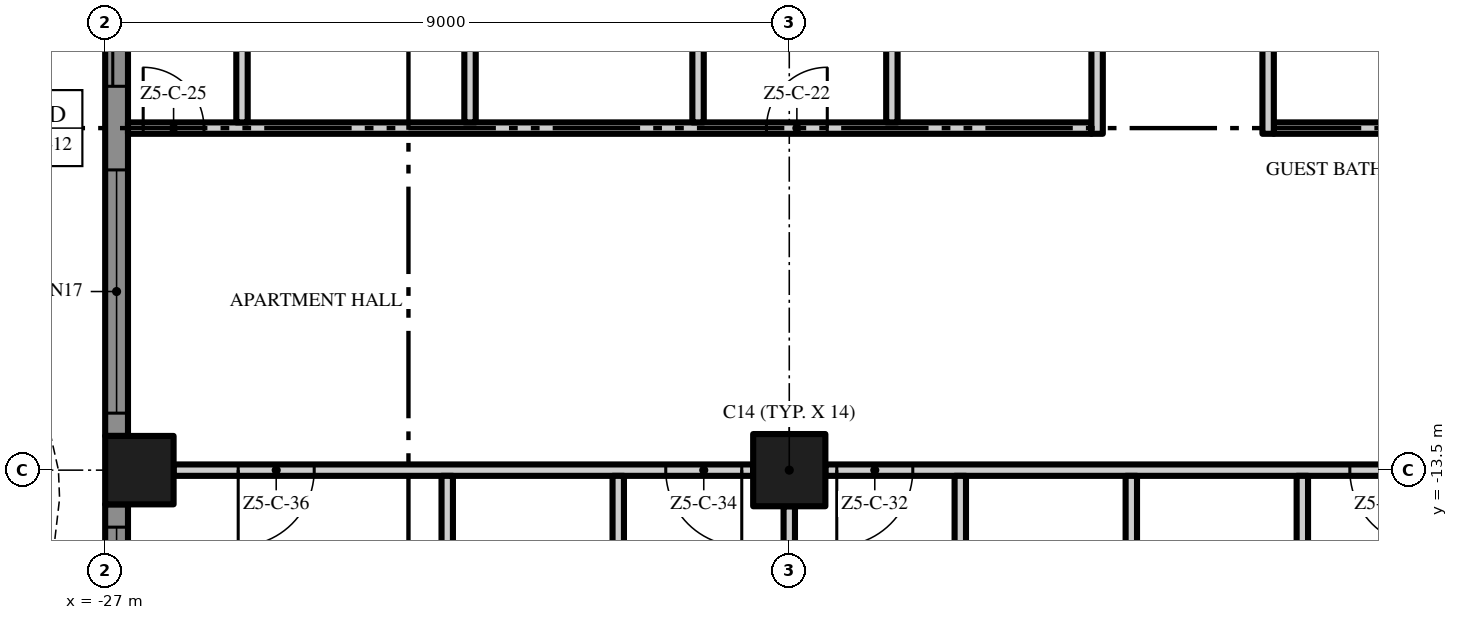
"""IFC4 building model, lengths in metres.
Left out: names, types, materials, properties, quantities, classifications, styles, units other than length and angle.
Written with IfcOpenShell. Run it as: python <this file> out.ifc"""

import sys

from ifc_helpers import new_model, si_unit, direction, frame, frame_2d, origin, origin_2d, place, context, subcontext, project, spatial, polyline, rectangle, outline, extrude, element, fill, save


model = new_model("IFC4")
c1 = context("Model", 3, precision=1e-05, world=origin(), true_north=direction((0.0, 1.0)))
c2 = subcontext(c1, "Body", "Model", "MODEL_VIEW")
j1 = project(units=[si_unit("LENGTHUNIT", "METRE"), si_unit("PLANEANGLEUNIT", "RADIAN")], contexts=[c1])
p1 = place(None, origin())
s1 = spatial("IfcSite", under=j1, at=p1, CompositionType="ELEMENT")
p2 = place(p1, origin())
s2 = spatial("IfcBuilding", under=s1, at=p2, CompositionType="ELEMENT")
p3 = place(p2, frame((0.0, 0.0, 261.6)))
s3 = spatial("IfcBuildingStorey", under=s2, at=p3, CompositionType="ELEMENT", Elevation=261.6)
p4 = place(p3, frame((-18.0, -13.5, 0.0), z_axis=(0.0, 0.0, 1.0), x_axis=(1.0, 0.0, 0.0)))
e1 = element("IfcColumn", 1, at=p4, inside=s3, PredefinedType="COLUMN", context=c2, shape_type="SweptSolid", body=[
    extrude(rectangle(XDim=0.95, YDim=0.95, at=origin_2d()), origin(), (0.0, 0.0, 1.0), 3.5),
])
p5 = place(p3, frame((-26.55, -13.5, 0.0), z_axis=(0.0, 0.0, 1.0), x_axis=(1.0, 0.0, 0.0)))
e2 = element("IfcColumn", 2, at=p5, inside=s3, PredefinedType="COLUMN", context=c2, shape_type="SweptSolid", body=[
    extrude(rectangle(XDim=0.9, YDim=0.9, at=origin_2d()), origin(), (0.0, 0.0, 1.0), 3.5),
])
p6 = place(p3, frame((-26.85, -13.05, 0.0), z_axis=(0.0, 0.0, 1.0), x_axis=(0.0, 1.0, 0.0)))
e3 = element("IfcWall", 3, at=p6, inside=s3, PredefinedType="SOLIDWALL", context=c2, shape_type="SweptSolid", body=[
    extrude(rectangle(XDim=8.1, YDim=0.3, at=frame_2d((4.05, 0.0))), origin(), (0.0, 0.0, 1.0), 3.5),
])
p7 = place(p6, frame((4.6, 0.0, 0.0)))
e4 = element("IfcOpeningElement", 4, at=p7, cuts=e3, PredefinedType="OPENING", context=c2, shape_type="SweptSolid", body=[
    extrude(rectangle(XDim=3.2, YDim=2.4, at=frame_2d((1.6, 1.2))), frame((0.0, 0.16, 0.0), z_axis=(0.0, -1.0, 0.0), x_axis=(1.0, 0.0, 0.0)), (0.0, 0.0, 1.0), 0.32),
])
p8 = place(p6, frame((0.3, 0.0, 0.45)))
e5 = element("IfcOpeningElement", 5, at=p8, cuts=e3, PredefinedType="OPENING", context=c2, shape_type="SweptSolid", body=[
    extrude(rectangle(XDim=3.2, YDim=2.65, at=frame_2d((1.6, 1.325))), frame((0.0, 0.16, 0.0), z_axis=(0.0, -1.0, 0.0), x_axis=(1.0, 0.0, 0.0)), (0.0, 0.0, 1.0), 0.32),
])
p9 = place(p3, frame((-26.85, -18.0, 0.0), z_axis=(0.0, 0.0, 1.0), x_axis=(0.0, 1.0, 0.0)))
e6 = element("IfcWall", 6, at=p9, inside=s3, PredefinedType="SOLIDWALL", context=c2, shape_type="SweptSolid", body=[
    extrude(rectangle(XDim=4.05, YDim=0.3, at=frame_2d((2.025, 0.0))), origin(), (0.0, 0.0, 1.0), 3.5),
])
p10 = place(p9, frame((0.55, 0.0, 0.45)))
e7 = element("IfcOpeningElement", 7, at=p10, cuts=e6, PredefinedType="OPENING", context=c2, shape_type="SweptSolid", body=[
    extrude(rectangle(XDim=3.2, YDim=2.65, at=frame_2d((1.6, 1.325))), frame((0.0, 0.16, 0.0), z_axis=(0.0, -1.0, 0.0), x_axis=(1.0, 0.0, 0.0)), (0.0, 0.0, 1.0), 0.32),
])
p11 = place(p3, origin())
e8 = element("IfcWall", 8, at=p11, inside=s3, PredefinedType="USERDEFINED", context=c2, shape_type="SweptSolid", body=[
    extrude(outline(polyline([(-27.951, 18.0), (-27.615, 16.5), (-27.6, 16.125), (-27.731, 15.0), (-28.255, 13.5), (-28.988, 12.0), (-29.649, 10.5), (-29.985, 9.0), (-30.0, 8.625), (-29.869, 7.5), (-29.345, 6.0), (-28.612, 4.5), (-27.951, 3.0), (-27.615, 1.5), (-27.6, 1.125), (-27.731, 0.0), (-28.255, -1.5), (-28.988, -3.0), (-29.649, -4.5), (-29.985, -6.0), (-30.0, -6.375), (-29.869, -7.5), (-29.345, -9.0), (-28.612, -10.5), (-27.951, -12.0), (-27.615, -13.5), (-27.6, -13.875), (-27.731, -15.0), (-28.255, -16.5), (-28.988, -18.0), (-28.763, -18.11), (-28.024, -16.596), (-27.486, -15.056), (-27.349, -13.885), (-27.366, -13.467), (-27.713, -11.921), (-28.385, -10.395), (-29.114, -8.904), (-29.624, -7.444), (-29.749, -6.365), (-29.736, -6.033), (-29.41, -4.579), (-28.761, -3.105), (-28.024, -1.596), (-27.486, -0.056), (-27.349, 1.115), (-27.366, 1.533), (-27.713, 3.079), (-28.385, 4.605), (-29.114, 6.096), (-29.624, 7.556), (-29.749, 8.635), (-29.736, 8.967), (-29.41, 10.421), (-28.761, 11.895), (-28.024, 13.404), (-27.486, 14.944), (-27.349, 16.115), (-27.366, 16.533), (-27.708, 18.055), (-27.951, 18.0)])), origin(), (0.0, 0.0, 1.0), 0.9),
])
p12 = place(p3, frame((-18.475, -13.5, 0.0), z_axis=(0.0, 0.0, 1.0), x_axis=(-1.0, 0.0, 0.0)))
e9 = element("IfcWall", 9, at=p12, inside=s3, PredefinedType="PARTITIONING", context=c2, shape_type="SweptSolid", body=[
    extrude(rectangle(XDim=7.625, YDim=0.15, at=frame_2d((3.812, 0.0))), origin(), (0.0, 0.0, 1.0), 3.5),
])
p13 = place(p12, frame((0.15, 0.0, 0.0)))
e10 = element("IfcOpeningElement", 10, at=p13, cuts=e9, PredefinedType="OPENING", context=c2, shape_type="SweptSolid", body=[
    extrude(rectangle(XDim=1.0, YDim=2.4, at=frame_2d((0.5, 1.2))), frame((0.0, 0.085, 0.0), z_axis=(0.0, -1.0, 0.0), x_axis=(1.0, 0.0, 0.0)), (0.0, 0.0, 1.0), 0.17),
])
p14 = place(p12, frame((5.775, 0.0, 0.0)))
e11 = element("IfcOpeningElement", 11, at=p14, cuts=e9, PredefinedType="OPENING", context=c2, shape_type="SweptSolid", body=[
    extrude(rectangle(XDim=1.0, YDim=2.4, at=frame_2d((0.5, 1.2))), frame((0.0, 0.085, 0.0), z_axis=(0.0, -1.0, 0.0), x_axis=(1.0, 0.0, 0.0)), (0.0, 0.0, 1.0), 0.17),
])
p15 = place(p3, frame((-9.475, -13.5, 0.0), z_axis=(0.0, 0.0, 1.0), x_axis=(-1.0, 0.0, 0.0)))
e12 = element("IfcWall", 12, at=p15, inside=s3, PredefinedType="PARTITIONING", context=c2, shape_type="SweptSolid", body=[
    extrude(rectangle(XDim=8.05, YDim=0.15, at=frame_2d((4.025, 0.0))), origin(), (0.0, 0.0, 1.0), 3.5),
])
p16 = place(p15, frame((0.15, 0.0, 0.0)))
e13 = element("IfcOpeningElement", 13, at=p16, cuts=e12, PredefinedType="OPENING", context=c2, shape_type="SweptSolid", body=[
    extrude(rectangle(XDim=1.0, YDim=2.4, at=frame_2d((0.5, 1.2))), frame((0.0, 0.085, 0.0), z_axis=(0.0, -1.0, 0.0), x_axis=(1.0, 0.0, 0.0)), (0.0, 0.0, 1.0), 0.17),
])
p17 = place(p15, frame((6.9, 0.0, 0.0)))
e14 = element("IfcOpeningElement", 14, at=p17, cuts=e12, PredefinedType="OPENING", context=c2, shape_type="SweptSolid", body=[
    extrude(rectangle(XDim=1.0, YDim=2.4, at=frame_2d((0.5, 1.2))), frame((0.0, 0.085, 0.0), z_axis=(0.0, -1.0, 0.0), x_axis=(1.0, 0.0, 0.0)), (0.0, 0.0, 1.0), 0.17),
])
p18 = place(p3, frame((-26.7, -9.0, 0.0), z_axis=(0.0, 0.0, 1.0), x_axis=(1.0, 0.0, 0.0)))
e15 = element("IfcWall", 15, at=p18, inside=s3, PredefinedType="PARTITIONING", context=c2, shape_type="SweptSolid", body=[
    extrude(rectangle(XDim=12.675, YDim=0.15, at=frame_2d((6.338, 0.0))), origin(), (0.0, 0.0, 1.0), 3.5),
])
p19 = place(p18, frame((8.4, 0.0, 0.0)))
e16 = element("IfcOpeningElement", 16, at=p19, cuts=e15, PredefinedType="OPENING", context=c2, shape_type="SweptSolid", body=[
    extrude(rectangle(XDim=0.8, YDim=2.0, at=frame_2d((0.4, 1.0))), frame((0.0, 0.085, 0.0), z_axis=(0.0, -1.0, 0.0), x_axis=(1.0, 0.0, 0.0)), (0.0, 0.0, 1.0), 0.17),
])
p20 = place(p18, frame((0.2, 0.0, 0.0)))
e17 = element("IfcOpeningElement", 17, at=p20, cuts=e15, PredefinedType="OPENING", context=c2, shape_type="SweptSolid", body=[
    extrude(rectangle(XDim=0.8, YDim=2.0, at=frame_2d((0.4, 1.0))), frame((0.0, 0.085, 0.0), z_axis=(0.0, -1.0, 0.0), x_axis=(1.0, 0.0, 0.0)), (0.0, 0.0, 1.0), 0.17),
])
p21 = place(p3, frame((-11.625, -9.0, 0.0), z_axis=(0.0, 0.0, 1.0), x_axis=(1.0, 0.0, 0.0)))
e18 = element("IfcWall", 18, at=p21, inside=s3, PredefinedType="PARTITIONING", context=c2, shape_type="SweptSolid", body=[
    extrude(rectangle(XDim=16.025, YDim=0.15, at=frame_2d((8.012, 0.0))), origin(), (0.0, 0.0, 1.0), 3.5),
])
p22 = place(p21, frame((4.675, 0.0, 0.0)))
e19 = element("IfcOpeningElement", 19, at=p22, cuts=e18, PredefinedType="OPENING", context=c2, shape_type="SweptSolid", body=[
    extrude(rectangle(XDim=1.0, YDim=2.4, at=frame_2d((0.5, 1.2))), frame((0.0, 0.085, 0.0), z_axis=(0.0, -1.0, 0.0), x_axis=(1.0, 0.0, 0.0)), (0.0, 0.0, 1.0), 0.17),
])
p23 = place(p3, frame((-25.2, -8.925, 0.0), z_axis=(0.0, 0.0, 1.0), x_axis=(0.0, 1.0, 0.0)))
e20 = element("IfcWall", 20, at=p23, inside=s3, PredefinedType="PARTITIONING", context=c2, shape_type="SweptSolid", body=[
    extrude(rectangle(XDim=4.35, YDim=0.15, at=frame_2d((2.175, 0.0))), origin(), (0.0, 0.0, 1.0), 3.5),
])
p24 = place(p3, frame((-22.5, -17.55, 0.0), z_axis=(0.0, 0.0, 1.0), x_axis=(0.0, 1.0, 0.0)))
e21 = element("IfcWall", 21, at=p24, inside=s3, PredefinedType="PARTITIONING", context=c2, shape_type="SweptSolid", body=[
    extrude(rectangle(XDim=3.975, YDim=0.15, at=frame_2d((1.988, 0.0))), origin(), (0.0, 0.0, 1.0), 3.5),
])
p25 = place(p3, frame((-22.2, -8.925, 0.0), z_axis=(0.0, 0.0, 1.0), x_axis=(0.0, 1.0, 0.0)))
e22 = element("IfcWall", 22, at=p25, inside=s3, PredefinedType="PARTITIONING", context=c2, shape_type="SweptSolid", body=[
    extrude(rectangle(XDim=4.35, YDim=0.15, at=frame_2d((2.175, 0.0))), origin(), (0.0, 0.0, 1.0), 3.5),
])
p26 = place(p3, frame((-20.25, -16.575, 0.0), z_axis=(0.0, 0.0, 1.0), x_axis=(0.0, 1.0, 0.0)))
e23 = element("IfcWall", 23, at=p26, inside=s3, PredefinedType="PARTITIONING", context=c2, shape_type="SweptSolid", body=[
    extrude(rectangle(XDim=3.0, YDim=0.15, at=frame_2d((1.5, 0.0))), origin(), (0.0, 0.0, 1.0), 3.5),
])
p27 = place(p3, frame((-19.2, -8.925, 0.0), z_axis=(0.0, 0.0, 1.0), x_axis=(0.0, 1.0, 0.0)))
e24 = element("IfcWall", 24, at=p27, inside=s3, PredefinedType="PARTITIONING", context=c2, shape_type="SweptSolid", body=[
    extrude(rectangle(XDim=4.35, YDim=0.15, at=frame_2d((2.175, 0.0))), origin(), (0.0, 0.0, 1.0), 3.5),
])
p28 = place(p3, frame((-18.0, -21.6, 0.0), z_axis=(0.0, 0.0, 1.0), x_axis=(0.0, 1.0, 0.0)))
e25 = element("IfcWall", 25, at=p28, inside=s3, PredefinedType="PARTITIONING", context=c2, shape_type="SweptSolid", body=[
    extrude(rectangle(XDim=7.625, YDim=0.15, at=frame_2d((3.812, 0.0))), origin(), (0.0, 0.0, 1.0), 3.5),
])
p29 = place(p3, frame((-16.65, -8.925, 0.0), z_axis=(0.0, 0.0, 1.0), x_axis=(0.0, 1.0, 0.0)))
e26 = element("IfcWall", 26, at=p29, inside=s3, PredefinedType="PARTITIONING", context=c2, shape_type="SweptSolid", body=[
    extrude(rectangle(XDim=4.35, YDim=0.15, at=frame_2d((2.175, 0.0))), origin(), (0.0, 0.0, 1.0), 3.5),
])
p30 = place(p3, frame((-15.75, -16.575, 0.0), z_axis=(0.0, 0.0, 1.0), x_axis=(0.0, 1.0, 0.0)))
e27 = element("IfcWall", 27, at=p30, inside=s3, PredefinedType="PARTITIONING", context=c2, shape_type="SweptSolid", body=[
    extrude(rectangle(XDim=3.0, YDim=0.15, at=frame_2d((1.5, 0.0))), origin(), (0.0, 0.0, 1.0), 3.5),
])
p31 = place(p3, frame((-13.95, -9.075, 0.0), z_axis=(0.0, 0.0, 1.0), x_axis=(0.0, 1.0, 0.0)))
e28 = element("IfcWall", 28, at=p31, inside=s3, PredefinedType="PARTITIONING", context=c2, shape_type="SweptSolid", body=[
    extrude(rectangle(XDim=4.65, YDim=0.15, at=frame_2d((2.325, 0.0))), origin(), (0.0, 0.0, 1.0), 3.5),
])
p32 = place(p3, frame((-13.5, -22.2, 0.0), z_axis=(0.0, 0.0, 1.0), x_axis=(0.0, 1.0, 0.0)))
e29 = element("IfcWall", 29, at=p32, inside=s3, PredefinedType="PARTITIONING", context=c2, shape_type="SweptSolid", body=[
    extrude(rectangle(XDim=8.625, YDim=0.15, at=frame_2d((4.312, 0.0))), origin(), (0.0, 0.0, 1.0), 3.5),
])
p33 = place(p3, frame((-11.7, -4.425, 0.0), z_axis=(0.0, 0.0, 1.0), x_axis=(0.0, -1.0, 0.0)))
e30 = element("IfcWall", 30, at=p33, inside=s3, PredefinedType="PARTITIONING", context=c2, shape_type="SweptSolid", body=[
    extrude(rectangle(XDim=4.65, YDim=0.15, at=frame_2d((2.325, 0.0))), origin(), (0.0, 0.0, 1.0), 3.5),
])
p34 = place(p33, frame((1.875, 0.0, 0.0)))
e31 = element("IfcOpeningElement", 31, at=p34, cuts=e30, PredefinedType="OPENING", context=c2, shape_type="SweptSolid", body=[
    extrude(rectangle(XDim=0.9, YDim=2.1, at=frame_2d((0.45, 1.05))), frame((0.0, 0.085, 0.0), z_axis=(0.0, -1.0, 0.0), x_axis=(1.0, 0.0, 0.0)), (0.0, 0.0, 1.0), 0.17),
])
p35 = place(p3, frame((-11.25, -16.575, 0.0), z_axis=(0.0, 0.0, 1.0), x_axis=(0.0, 1.0, 0.0)))
e32 = element("IfcWall", 32, at=p35, inside=s3, PredefinedType="PARTITIONING", context=c2, shape_type="SweptSolid", body=[
    extrude(rectangle(XDim=3.0, YDim=0.15, at=frame_2d((1.5, 0.0))), origin(), (0.0, 0.0, 1.0), 3.5),
])
p36 = place(p7, origin())
e33 = element("IfcDoor", 33, at=p36, inside=s3, OperationType="SINGLE_SWING_LEFT", PredefinedType="DOOR", context=c2, shape_type="SweptSolid", body=[
    extrude(rectangle(XDim=3.2, YDim=2.4, at=frame_2d((1.6, 1.2))), frame((0.0, 0.025, 0.0), z_axis=(0.0, -1.0, 0.0), x_axis=(1.0, 0.0, 0.0)), (0.0, 0.0, 1.0), 0.05),
])
fill(e4, e33)
p37 = place(p8, origin())
e34 = element("IfcWindow", 34, at=p37, inside=s3, PartitioningType="SINGLE_PANEL", PredefinedType="WINDOW", context=c2, shape_type="SweptSolid", body=[
    extrude(rectangle(XDim=3.2, YDim=2.65, at=frame_2d((1.6, 1.325))), frame((0.0, 0.03, 0.0), z_axis=(0.0, -1.0, 0.0), x_axis=(1.0, 0.0, 0.0)), (0.0, 0.0, 1.0), 0.06),
])
fill(e5, e34)
p38 = place(p10, origin())
e35 = element("IfcWindow", 35, at=p38, inside=s3, PartitioningType="SINGLE_PANEL", PredefinedType="WINDOW", context=c2, shape_type="SweptSolid", body=[
    extrude(rectangle(XDim=3.2, YDim=2.65, at=frame_2d((1.6, 1.325))), frame((0.0, 0.03, 0.0), z_axis=(0.0, -1.0, 0.0), x_axis=(1.0, 0.0, 0.0)), (0.0, 0.0, 1.0), 0.06),
])
fill(e7, e35)
p39 = place(p19, origin())
e36 = element("IfcDoor", 36, at=p39, inside=s3, OperationType="SINGLE_SWING_RIGHT", PredefinedType="DOOR", context=c2, shape_type="SweptSolid", body=[
    extrude(rectangle(XDim=0.8, YDim=2.0, at=frame_2d((0.4, 1.0))), frame((0.0, 0.025, 0.0), z_axis=(0.0, -1.0, 0.0), x_axis=(1.0, 0.0, 0.0)), (0.0, 0.0, 1.0), 0.05),
])
fill(e16, e36)
p40 = place(p20, origin())
e37 = element("IfcDoor", 37, at=p40, inside=s3, OperationType="SINGLE_SWING_LEFT", PredefinedType="DOOR", context=c2, shape_type="SweptSolid", body=[
    extrude(rectangle(XDim=0.8, YDim=2.0, at=frame_2d((0.4, 1.0))), frame((0.0, 0.025, 0.0), z_axis=(0.0, -1.0, 0.0), x_axis=(1.0, 0.0, 0.0)), (0.0, 0.0, 1.0), 0.05),
])
fill(e17, e37)
p41 = place(p16, origin())
e38 = element("IfcDoor", 38, at=p41, inside=s3, OperationType="SINGLE_SWING_LEFT", PredefinedType="DOOR", context=c2, shape_type="SweptSolid", body=[
    extrude(rectangle(XDim=1.0, YDim=2.4, at=frame_2d((0.5, 1.2))), frame((0.0, 0.025, 0.0), z_axis=(0.0, -1.0, 0.0), x_axis=(1.0, 0.0, 0.0)), (0.0, 0.0, 1.0), 0.05),
])
fill(e13, e38)
p42 = place(p17, origin())
e39 = element("IfcDoor", 39, at=p42, inside=s3, OperationType="SINGLE_SWING_RIGHT", PredefinedType="DOOR", context=c2, shape_type="SweptSolid", body=[
    extrude(rectangle(XDim=1.0, YDim=2.4, at=frame_2d((0.5, 1.2))), frame((0.0, 0.025, 0.0), z_axis=(0.0, -1.0, 0.0), x_axis=(1.0, 0.0, 0.0)), (0.0, 0.0, 1.0), 0.05),
])
fill(e14, e39)
p43 = place(p13, origin())
e40 = element("IfcDoor", 40, at=p43, inside=s3, OperationType="SINGLE_SWING_LEFT", PredefinedType="DOOR", context=c2, shape_type="SweptSolid", body=[
    extrude(rectangle(XDim=1.0, YDim=2.4, at=frame_2d((0.5, 1.2))), frame((0.0, 0.025, 0.0), z_axis=(0.0, -1.0, 0.0), x_axis=(1.0, 0.0, 0.0)), (0.0, 0.0, 1.0), 0.05),
])
fill(e10, e40)
p44 = place(p14, origin())
e41 = element("IfcDoor", 41, at=p44, inside=s3, OperationType="SINGLE_SWING_RIGHT", PredefinedType="DOOR", context=c2, shape_type="SweptSolid", body=[
    extrude(rectangle(XDim=1.0, YDim=2.4, at=frame_2d((0.5, 1.2))), frame((0.0, 0.025, 0.0), z_axis=(0.0, -1.0, 0.0), x_axis=(1.0, 0.0, 0.0)), (0.0, 0.0, 1.0), 0.05),
])
fill(e11, e41)
save(model, sys.argv[1])
